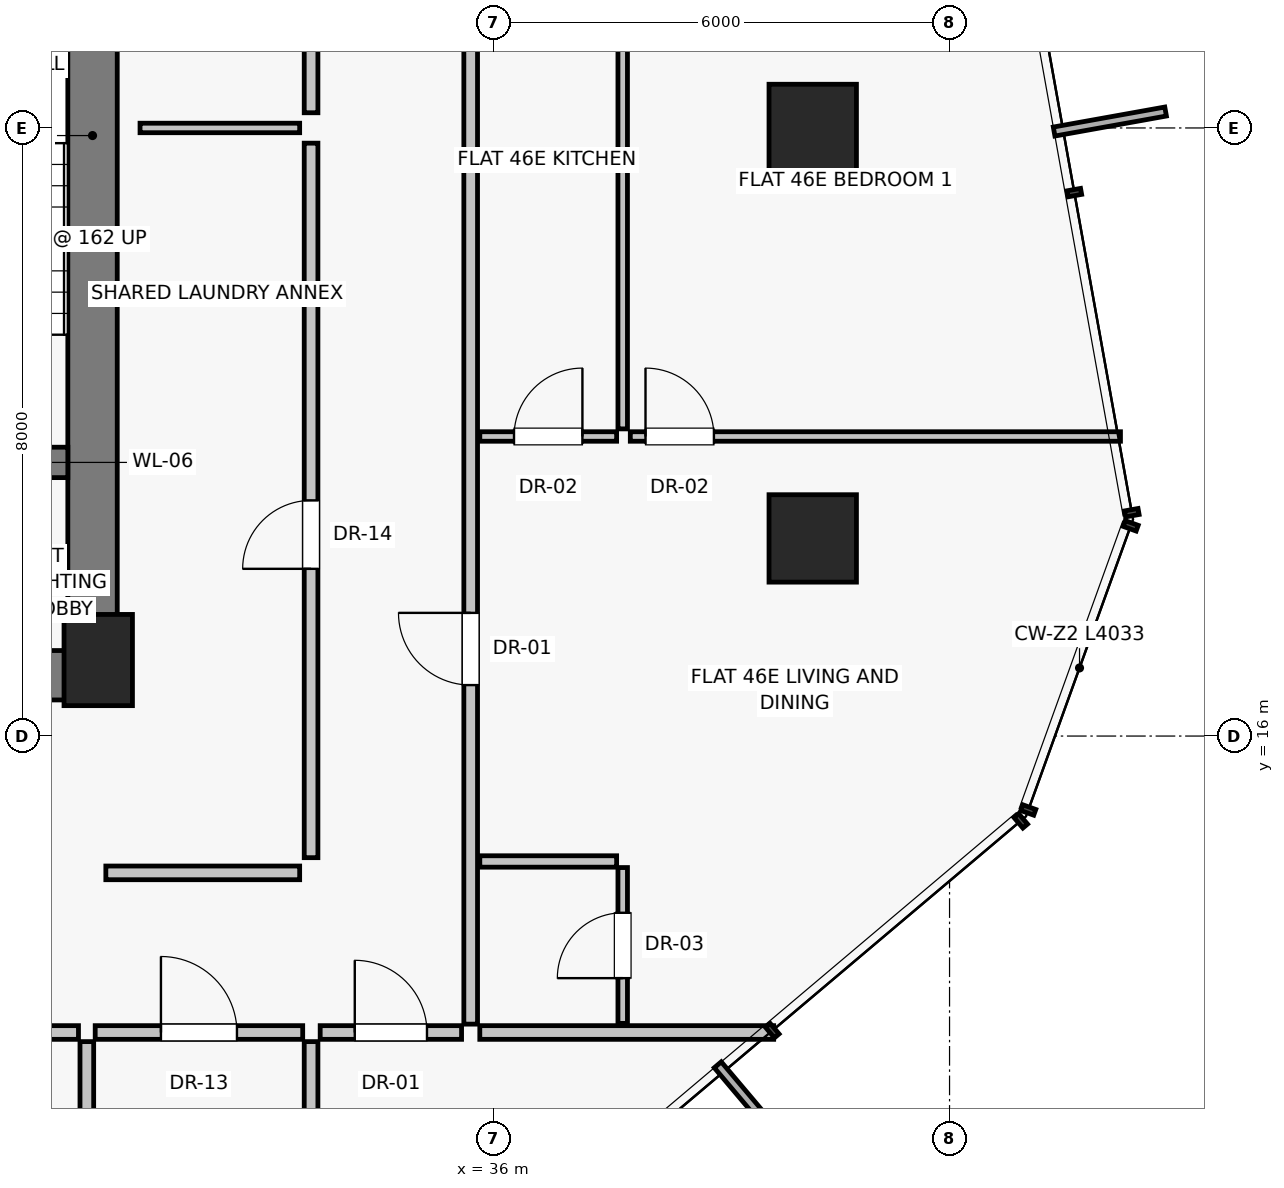
"""IFC4 building model, lengths in metres.
Left out: names, types, materials, properties, quantities, classifications, styles, units other than length and angle.
Written with IfcOpenShell. Run it as: python <this file> out.ifc"""

import sys

from ifc_helpers import new_model, si_unit, direction, frame, frame_2d, origin, origin_2d, place, context, subcontext, project, spatial, rectangle, extrude, source, transform, mapped, element, fill, save


model = new_model("IFC4")
c1 = context("Model", 3, precision=1e-05, world=origin(), true_north=direction((0.0, 1.0)))
c2 = subcontext(c1, "Body", "Model", "MODEL_VIEW")
j1 = project(units=[si_unit("LENGTHUNIT", "METRE"), si_unit("PLANEANGLEUNIT", "RADIAN")], contexts=[c1])
p1 = place(None, origin())
s1 = spatial("IfcSite", under=j1, at=p1, CompositionType="ELEMENT")
p2 = place(p1, origin())
s2 = spatial("IfcBuilding", under=s1, at=p2, CompositionType="ELEMENT")
p3 = place(p2, frame((0.0, 0.0, 163.05)))
s3 = spatial("IfcBuildingStorey", under=s2, at=p3, CompositionType="ELEMENT", Elevation=163.05)
p4 = place(p3, frame((30.8, 17.0, 0.0), z_axis=(0.0, 0.0, 1.0), x_axis=(1.0, 0.0, 0.0)))
e1 = element("IfcColumn", 1, at=p4, inside=s3, PredefinedType="PILASTER", context=c2, shape_type="SweptSolid", body=[
    extrude(rectangle(XDim=0.9, YDim=1.2, at=origin_2d()), origin(), (0.0, 0.0, 1.0), 3.25),
])
for number, where, z_axis, x_axis in (
    (2, (40.2, 18.6, 0.0), (0.0, 0.0, 1.0), (1.0, 0.0, 0.0)),
    (3, (40.2, 24.0, 0.0), (0.0, 0.0, 1.0), (1.0, 0.0, 0.0)),
):
    element("IfcColumn", number, at=place(p3, frame(where, z_axis=z_axis, x_axis=x_axis)), inside=s3, PredefinedType="COLUMN", context=c2, shape_type="SweptSolid", body=[
        extrude(rectangle(XDim=1.15, YDim=1.15, at=origin_2d()), origin(), (0.0, 0.0, 1.0), 3.25),
    ])
p5 = place(p3, frame((30.725, 16.8, 0.0), z_axis=(0.0, 0.0, 1.0), x_axis=(0.0, 1.0, 0.0)))
e4 = element("IfcWall", 4, at=p5, inside=s3, PredefinedType="SHEAR", context=c2, shape_type="SweptSolid", body=[
    extrude(rectangle(XDim=14.2, YDim=0.65, at=frame_2d((7.1, 0.0))), origin(), (0.0, 0.0, 1.0), 3.0),
])
p6 = place(p3, frame((24.95, 16.8, 0.0), z_axis=(0.0, 0.0, 1.0), x_axis=(1.0, 0.0, 0.0)))
e5 = element("IfcWall", 5, at=p6, inside=s3, PredefinedType="SHEAR", context=c2, shape_type="SweptSolid", body=[
    extrude(rectangle(XDim=5.85, YDim=0.65, at=frame_2d((2.925, 0.0))), origin(), (0.0, 0.0, 1.0), 3.0),
])
p7 = place(p6, frame((2.15, 0.0, 0.0)))
e6 = element("IfcOpeningElement", 6, at=p7, cuts=e5, PredefinedType="OPENING", context=c2, shape_type="SweptSolid", body=[
    extrude(rectangle(XDim=1.2, YDim=2.03, at=frame_2d((0.6, 1.015))), frame((0.0, 0.335, 0.0), z_axis=(0.0, -1.0, 0.0), x_axis=(1.0, 0.0, 0.0)), (0.0, 0.0, 1.0), 0.67),
])
p8 = place(p3, frame((27.0, 19.6, 0.0), z_axis=(0.0, 0.0, 1.0), x_axis=(1.0, 0.0, 0.0)))
e7 = element("IfcWall", 7, at=p8, inside=s3, PredefinedType="SHEAR", context=c2, shape_type="SweptSolid", body=[
    extrude(rectangle(XDim=3.4, YDim=0.4, at=frame_2d((1.7, 0.0))), origin(), (0.0, 0.0, 1.0), 3.0),
])
p9 = place(p8, frame((1.05, 0.0, 0.0)))
e8 = element("IfcOpeningElement", 8, at=p9, cuts=e7, PredefinedType="OPENING", context=c2, shape_type="SweptSolid", body=[
    extrude(rectangle(XDim=1.1, YDim=2.03, at=frame_2d((0.55, 1.015))), frame((0.0, 0.21, 0.0), z_axis=(0.0, -1.0, 0.0), x_axis=(1.0, 0.0, 0.0)), (0.0, 0.0, 1.0), 0.42),
])
p10 = place(p3, frame((33.6, 14.4, 0.0), z_axis=(0.0, 0.0, 1.0), x_axis=(0.0, 1.0, 0.0)))
e9 = element("IfcWall", 9, at=p10, inside=s3, PredefinedType="PARTITIONING", context=c2, shape_type="SweptSolid", body=[
    extrude(rectangle(XDim=9.4, YDim=0.18, at=frame_2d((4.7, 0.0))), origin(), (0.0, 0.0, 1.0), 3.0),
])
p11 = place(p10, frame((3.8, 0.0, 0.0)))
e10 = element("IfcOpeningElement", 10, at=p11, cuts=e9, PredefinedType="OPENING", context=c2, shape_type="SweptSolid", body=[
    extrude(rectangle(XDim=0.9, YDim=2.01, at=frame_2d((0.45, 1.005))), frame((0.0, 0.1, 0.0), z_axis=(0.0, -1.0, 0.0), x_axis=(1.0, 0.0, 0.0)), (0.0, 0.0, 1.0), 0.2),
])
p12 = place(p3, frame((33.6, 24.2, 0.0), z_axis=(0.0, 0.0, 1.0), x_axis=(0.0, 1.0, 0.0)))
e11 = element("IfcWall", 11, at=p12, inside=s3, PredefinedType="PARTITIONING", context=c2, shape_type="SweptSolid", body=[
    extrude(rectangle(XDim=9.2, YDim=0.18, at=frame_2d((4.6, 0.0))), origin(), (0.0, 0.0, 1.0), 3.0),
])
p13 = place(p12, frame((3.8, 0.0, 0.0)))
e12 = element("IfcOpeningElement", 12, at=p13, cuts=e11, PredefinedType="OPENING", context=c2, shape_type="SweptSolid", body=[
    extrude(rectangle(XDim=0.9, YDim=2.01, at=frame_2d((0.45, 1.005))), frame((0.0, 0.1, 0.0), z_axis=(0.0, -1.0, 0.0), x_axis=(1.0, 0.0, 0.0)), (0.0, 0.0, 1.0), 0.2),
])
p14 = place(p3, frame((31.35, 24.0, 0.0), z_axis=(0.0, 0.0, 1.0), x_axis=(1.0, 0.0, 0.0)))
e13 = element("IfcWall", 13, at=p14, inside=s3, PredefinedType="PARTITIONING", context=c2, shape_type="SweptSolid", body=[
    extrude(rectangle(XDim=2.1, YDim=0.125, at=frame_2d((1.05, 0.0))), origin(), (0.0, 0.0, 1.0), 3.0),
])
p15 = place(p3, frame((30.9, 14.2, 0.0), z_axis=(0.0, 0.0, 1.0), x_axis=(1.0, 0.0, 0.0)))
e14 = element("IfcWall", 14, at=p15, inside=s3, PredefinedType="PARTITIONING", context=c2, shape_type="SweptSolid", body=[
    extrude(rectangle(XDim=2.55, YDim=0.18, at=frame_2d((1.275, 0.0))), origin(), (0.0, 0.0, 1.0), 3.0),
])
p16 = place(p3, frame((33.6, 11.98, 0.0), z_axis=(0.0, 0.0, 1.0), x_axis=(0.0, -1.0, 0.0)))
e15 = element("IfcWall", 15, at=p16, inside=s3, PredefinedType="PARTITIONING", context=c2, shape_type="SweptSolid", body=[
    extrude(rectangle(XDim=5.02, YDim=0.18, at=frame_2d((2.51, 0.0))), origin(), (0.0, 0.0, 1.0), 3.0),
])
p17 = place(p3, frame((30.76, 12.1, 0.0), z_axis=(0.0, 0.0, 1.0), x_axis=(1.0, 0.0, 0.0)))
e16 = element("IfcWall", 16, at=p17, inside=s3, PredefinedType="PARTITIONING", context=c2, shape_type="SweptSolid", body=[
    extrude(rectangle(XDim=2.73, YDim=0.18, at=frame_2d((1.365, 0.0))), origin(), (0.0, 0.0, 1.0), 3.0),
])
p18 = place(p17, frame((0.865, 0.0, 0.0)))
e17 = element("IfcOpeningElement", 17, at=p18, cuts=e16, PredefinedType="OPENING", context=c2, shape_type="SweptSolid", body=[
    extrude(rectangle(XDim=1.0, YDim=2.01, at=frame_2d((0.5, 1.005))), frame((0.0, 0.1, 0.0), z_axis=(0.0, -1.0, 0.0), x_axis=(1.0, 0.0, 0.0)), (0.0, 0.0, 1.0), 0.2),
])
p19 = place(p3, frame((30.65, 11.98, 0.0), z_axis=(0.0, 0.0, 1.0), x_axis=(0.0, -1.0, 0.0)))
e18 = element("IfcWall", 18, at=p19, inside=s3, PredefinedType="PARTITIONING", context=c2, shape_type="SweptSolid", body=[
    extrude(rectangle(XDim=7.511, YDim=0.18, at=frame_2d((3.755, 0.0))), origin(), (0.0, 0.0, 1.0), 3.0),
])
p20 = place(p3, frame((25.866, 12.1, 0.0), z_axis=(0.0, 0.0, 1.0), x_axis=(1.0, 0.0, 0.0)))
e19 = element("IfcWall", 19, at=p20, inside=s3, PredefinedType="PARTITIONING", context=c2, shape_type="SweptSolid", body=[
    extrude(rectangle(XDim=4.674, YDim=0.18, at=frame_2d((2.337, 0.0))), origin(), (0.0, 0.0, 1.0), 2.58),
])
p21 = place(p20, frame((2.66, 0.0, 0.0)))
e20 = element("IfcOpeningElement", 20, at=p21, cuts=e19, PredefinedType="OPENING", context=c2, shape_type="SweptSolid", body=[
    extrude(rectangle(XDim=0.95, YDim=2.02, at=frame_2d((0.475, 1.01))), frame((0.0, 0.1, 0.0), z_axis=(0.0, -1.0, 0.0), x_axis=(1.0, 0.0, 0.0)), (0.0, 0.0, 1.0), 0.2),
])
p22 = place(p3, frame((35.82, 12.1, 0.0), z_axis=(0.0, 0.0, 1.0), x_axis=(1.0, 0.0, 0.0)))
e21 = element("IfcWall", 21, at=p22, inside=s3, PredefinedType="PARTITIONING", context=c2, shape_type="SweptSolid", body=[
    extrude(rectangle(XDim=3.866, YDim=0.18, at=frame_2d((1.933, 0.0))), origin(), (0.0, 0.0, 1.0), 3.0),
])
p23 = place(p3, frame((35.7, 12.21, 0.0), z_axis=(0.0, 0.0, 1.0), x_axis=(0.0, 1.0, 0.0)))
e22 = element("IfcWall", 22, at=p23, inside=s3, PredefinedType="PARTITIONING", context=c2, shape_type="SweptSolid", body=[
    extrude(rectangle(XDim=13.782, YDim=0.18, at=frame_2d((6.891, 0.0))), origin(), (0.0, 0.0, 1.0), 2.58),
])
p24 = place(p23, frame((4.46, 0.0, 0.0)))
e23 = element("IfcOpeningElement", 23, at=p24, cuts=e22, PredefinedType="OPENING", context=c2, shape_type="SweptSolid", body=[
    extrude(rectangle(XDim=0.95, YDim=2.02, at=frame_2d((0.475, 1.01))), frame((0.0, 0.1, 0.0), z_axis=(0.0, -1.0, 0.0), x_axis=(1.0, 0.0, 0.0)), (0.0, 0.0, 1.0), 0.2),
])
p25 = place(p3, frame((35.82, 14.35, 0.0), z_axis=(0.0, 0.0, 1.0), x_axis=(1.0, 0.0, 0.0)))
e24 = element("IfcWall", 24, at=p25, inside=s3, PredefinedType="PARTITIONING", context=c2, shape_type="SweptSolid", body=[
    extrude(rectangle(XDim=1.8, YDim=0.15, at=frame_2d((0.9, 0.0))), origin(), (0.0, 0.0, 1.0), 3.0),
])
p26 = place(p3, frame((37.7, 12.22, 0.0), z_axis=(0.0, 0.0, 1.0), x_axis=(0.0, 1.0, 0.0)))
e25 = element("IfcWall", 25, at=p26, inside=s3, PredefinedType="PARTITIONING", context=c2, shape_type="SweptSolid", body=[
    extrude(rectangle(XDim=2.05, YDim=0.125, at=frame_2d((1.025, 0.0))), origin(), (0.0, 0.0, 1.0), 3.0),
])
p27 = place(p26, frame((0.595, 0.0, 0.0)))
e26 = element("IfcOpeningElement", 26, at=p27, cuts=e25, PredefinedType="OPENING", context=c2, shape_type="SweptSolid", body=[
    extrude(rectangle(XDim=0.86, YDim=2.01, at=frame_2d((0.43, 1.005))), frame((0.0, 0.073, 0.0), z_axis=(0.0, -1.0, 0.0), x_axis=(1.0, 0.0, 0.0)), (0.0, 0.0, 1.0), 0.145),
])
p28 = place(p3, frame((35.82, 19.941, 0.0), z_axis=(0.0, 0.0, 1.0), x_axis=(1.0, 0.0, 0.0)))
e27 = element("IfcWall", 27, at=p28, inside=s3, PredefinedType="PARTITIONING", context=c2, shape_type="SweptSolid", body=[
    extrude(rectangle(XDim=1.8, YDim=0.125, at=frame_2d((0.9, 0.0))), origin(), (0.0, 0.0, 1.0), 3.0),
])
p29 = place(p28, frame((0.45, 0.0, 0.0)))
e28 = element("IfcOpeningElement", 28, at=p29, cuts=e27, PredefinedType="OPENING", context=c2, shape_type="SweptSolid", body=[
    extrude(rectangle(XDim=0.9, YDim=2.01, at=frame_2d((0.45, 1.005))), frame((0.0, 0.073, 0.0), z_axis=(0.0, -1.0, 0.0), x_axis=(1.0, 0.0, 0.0)), (0.0, 0.0, 1.0), 0.145),
])
p30 = place(p3, frame((37.7, 20.041, 0.0), z_axis=(0.0, 0.0, 1.0), x_axis=(0.0, 1.0, 0.0)))
e29 = element("IfcWall", 29, at=p30, inside=s3, PredefinedType="PARTITIONING", context=c2, shape_type="SweptSolid", body=[
    extrude(rectangle(XDim=5.941, YDim=0.125, at=frame_2d((2.97, 0.0))), origin(), (0.0, 0.0, 1.0), 3.0),
])
p31 = place(p3, frame((37.8, 19.941, 0.0), z_axis=(0.0, 0.0, 1.0), x_axis=(1.0, 0.0, 0.0)))
e30 = element("IfcWall", 30, at=p31, inside=s3, PredefinedType="PARTITIONING", context=c2, shape_type="SweptSolid", body=[
    extrude(rectangle(XDim=6.448, YDim=0.125, at=frame_2d((3.224, 0.0))), origin(), (0.0, 0.0, 1.0), 3.0),
])
p32 = place(p31, frame((0.2, 0.0, 0.0)))
e31 = element("IfcOpeningElement", 31, at=p32, cuts=e30, PredefinedType="OPENING", context=c2, shape_type="SweptSolid", body=[
    extrude(rectangle(XDim=0.9, YDim=2.01, at=frame_2d((0.45, 1.005))), frame((0.0, 0.073, 0.0), z_axis=(0.0, -1.0, 0.0), x_axis=(1.0, 0.0, 0.0)), (0.0, 0.0, 1.0), 0.145),
])
p33 = place(p3, frame((33.72, 12.1, 0.0), z_axis=(0.0, 0.0, 1.0), x_axis=(1.0, 0.0, 0.0)))
e32 = element("IfcWall", 32, at=p33, inside=s3, PredefinedType="PARTITIONING", context=c2, shape_type="SweptSolid", body=[
    extrude(rectangle(XDim=1.86, YDim=0.18, at=frame_2d((0.93, 0.0))), origin(), (0.0, 0.0, 1.0), 3.0),
])
p34 = place(p33, frame((0.455, 0.0, 0.0)))
e33 = element("IfcOpeningElement", 33, at=p34, cuts=e32, PredefinedType="OPENING", context=c2, shape_type="SweptSolid", body=[
    extrude(rectangle(XDim=0.95, YDim=2.02, at=frame_2d((0.475, 1.01))), frame((0.0, 0.1, 0.0), z_axis=(0.0, -1.0, 0.0), x_axis=(1.0, 0.0, 0.0)), (0.0, 0.0, 1.0), 0.2),
])
m1 = source(origin(), c2, "Body", "SweptSolid", [
    extrude(rectangle(XDim=0.9, YDim=2.01, at=frame_2d((0.45, 1.005))), frame((0.0, 0.025, 0.0), z_axis=(0.0, -1.0, 0.0), x_axis=(1.0, 0.0, 0.0)), (0.0, 0.0, 1.0), 0.05),
])
p35 = place(p11, origin())
e34 = element("IfcDoor", 34, at=p35, inside=s3, OperationType="SINGLE_SWING_LEFT", PredefinedType="DOOR", context=c2, shape_type="MappedRepresentation", body=[
    mapped(m1, transform((0.0, 0.0, 0.0), scale=1.0)),
])
fill(e10, e34)
m2 = source(origin(), c2, "Body", "SweptSolid", [
    extrude(rectangle(XDim=1.0, YDim=2.01, at=frame_2d((0.5, 1.005))), frame((0.0, 0.025, 0.0), z_axis=(0.0, -1.0, 0.0), x_axis=(1.0, 0.0, 0.0)), (0.0, 0.0, 1.0), 0.05),
])
p36 = place(p18, origin())
e35 = element("IfcDoor", 35, at=p36, inside=s3, OperationType="SINGLE_SWING_LEFT", PredefinedType="DOOR", context=c2, shape_type="MappedRepresentation", body=[
    mapped(m2, transform((0.0, 0.0, 0.0), scale=1.0)),
])
fill(e17, e35)
m3 = source(origin(), c2, "Body", "SweptSolid", [
    extrude(rectangle(XDim=0.95, YDim=2.02, at=frame_2d((0.475, 1.01))), frame((0.0, 0.025, 0.0), z_axis=(0.0, -1.0, 0.0), x_axis=(1.0, 0.0, 0.0)), (0.0, 0.0, 1.0), 0.05),
])
p37 = place(p24, origin())
e36 = element("IfcDoor", 36, at=p37, inside=s3, OperationType="SINGLE_SWING_RIGHT", PredefinedType="DOOR", context=c2, shape_type="MappedRepresentation", body=[
    mapped(m3, transform((0.0, 0.0, 0.0), scale=1.0)),
])
fill(e23, e36)
m4 = source(origin(), c2, "Body", "SweptSolid", [
    extrude(rectangle(XDim=0.86, YDim=2.01, at=frame_2d((0.43, 1.005))), frame((0.0, 0.025, 0.0), z_axis=(0.0, -1.0, 0.0), x_axis=(1.0, 0.0, 0.0)), (0.0, 0.0, 1.0), 0.05),
])
p38 = place(p27, origin())
e37 = element("IfcDoor", 37, at=p38, inside=s3, OperationType="SINGLE_SWING_LEFT", PredefinedType="DOOR", context=c2, shape_type="MappedRepresentation", body=[
    mapped(m4, transform((0.0, 0.0, 0.0), scale=1.0)),
])
fill(e26, e37)
p39 = place(p29, origin())
e38 = element("IfcDoor", 38, at=p39, inside=s3, OperationType="SINGLE_SWING_RIGHT", PredefinedType="DOOR", context=c2, shape_type="MappedRepresentation", body=[
    mapped(m1, transform((0.0, 0.0, 0.0), scale=1.0)),
])
fill(e28, e38)
p40 = place(p32, origin())
e39 = element("IfcDoor", 39, at=p40, inside=s3, OperationType="SINGLE_SWING_LEFT", PredefinedType="DOOR", context=c2, shape_type="MappedRepresentation", body=[
    mapped(m1, transform((0.0, 0.0, 0.0), scale=1.0)),
])
fill(e31, e39)
p41 = place(p34, origin())
e40 = element("IfcDoor", 40, at=p41, inside=s3, OperationType="SINGLE_SWING_LEFT", PredefinedType="DOOR", context=c2, shape_type="MappedRepresentation", body=[
    mapped(m3, transform((0.0, 0.0, 0.0), scale=1.0)),
])
fill(e33, e40)
save(model, sys.argv[1])
